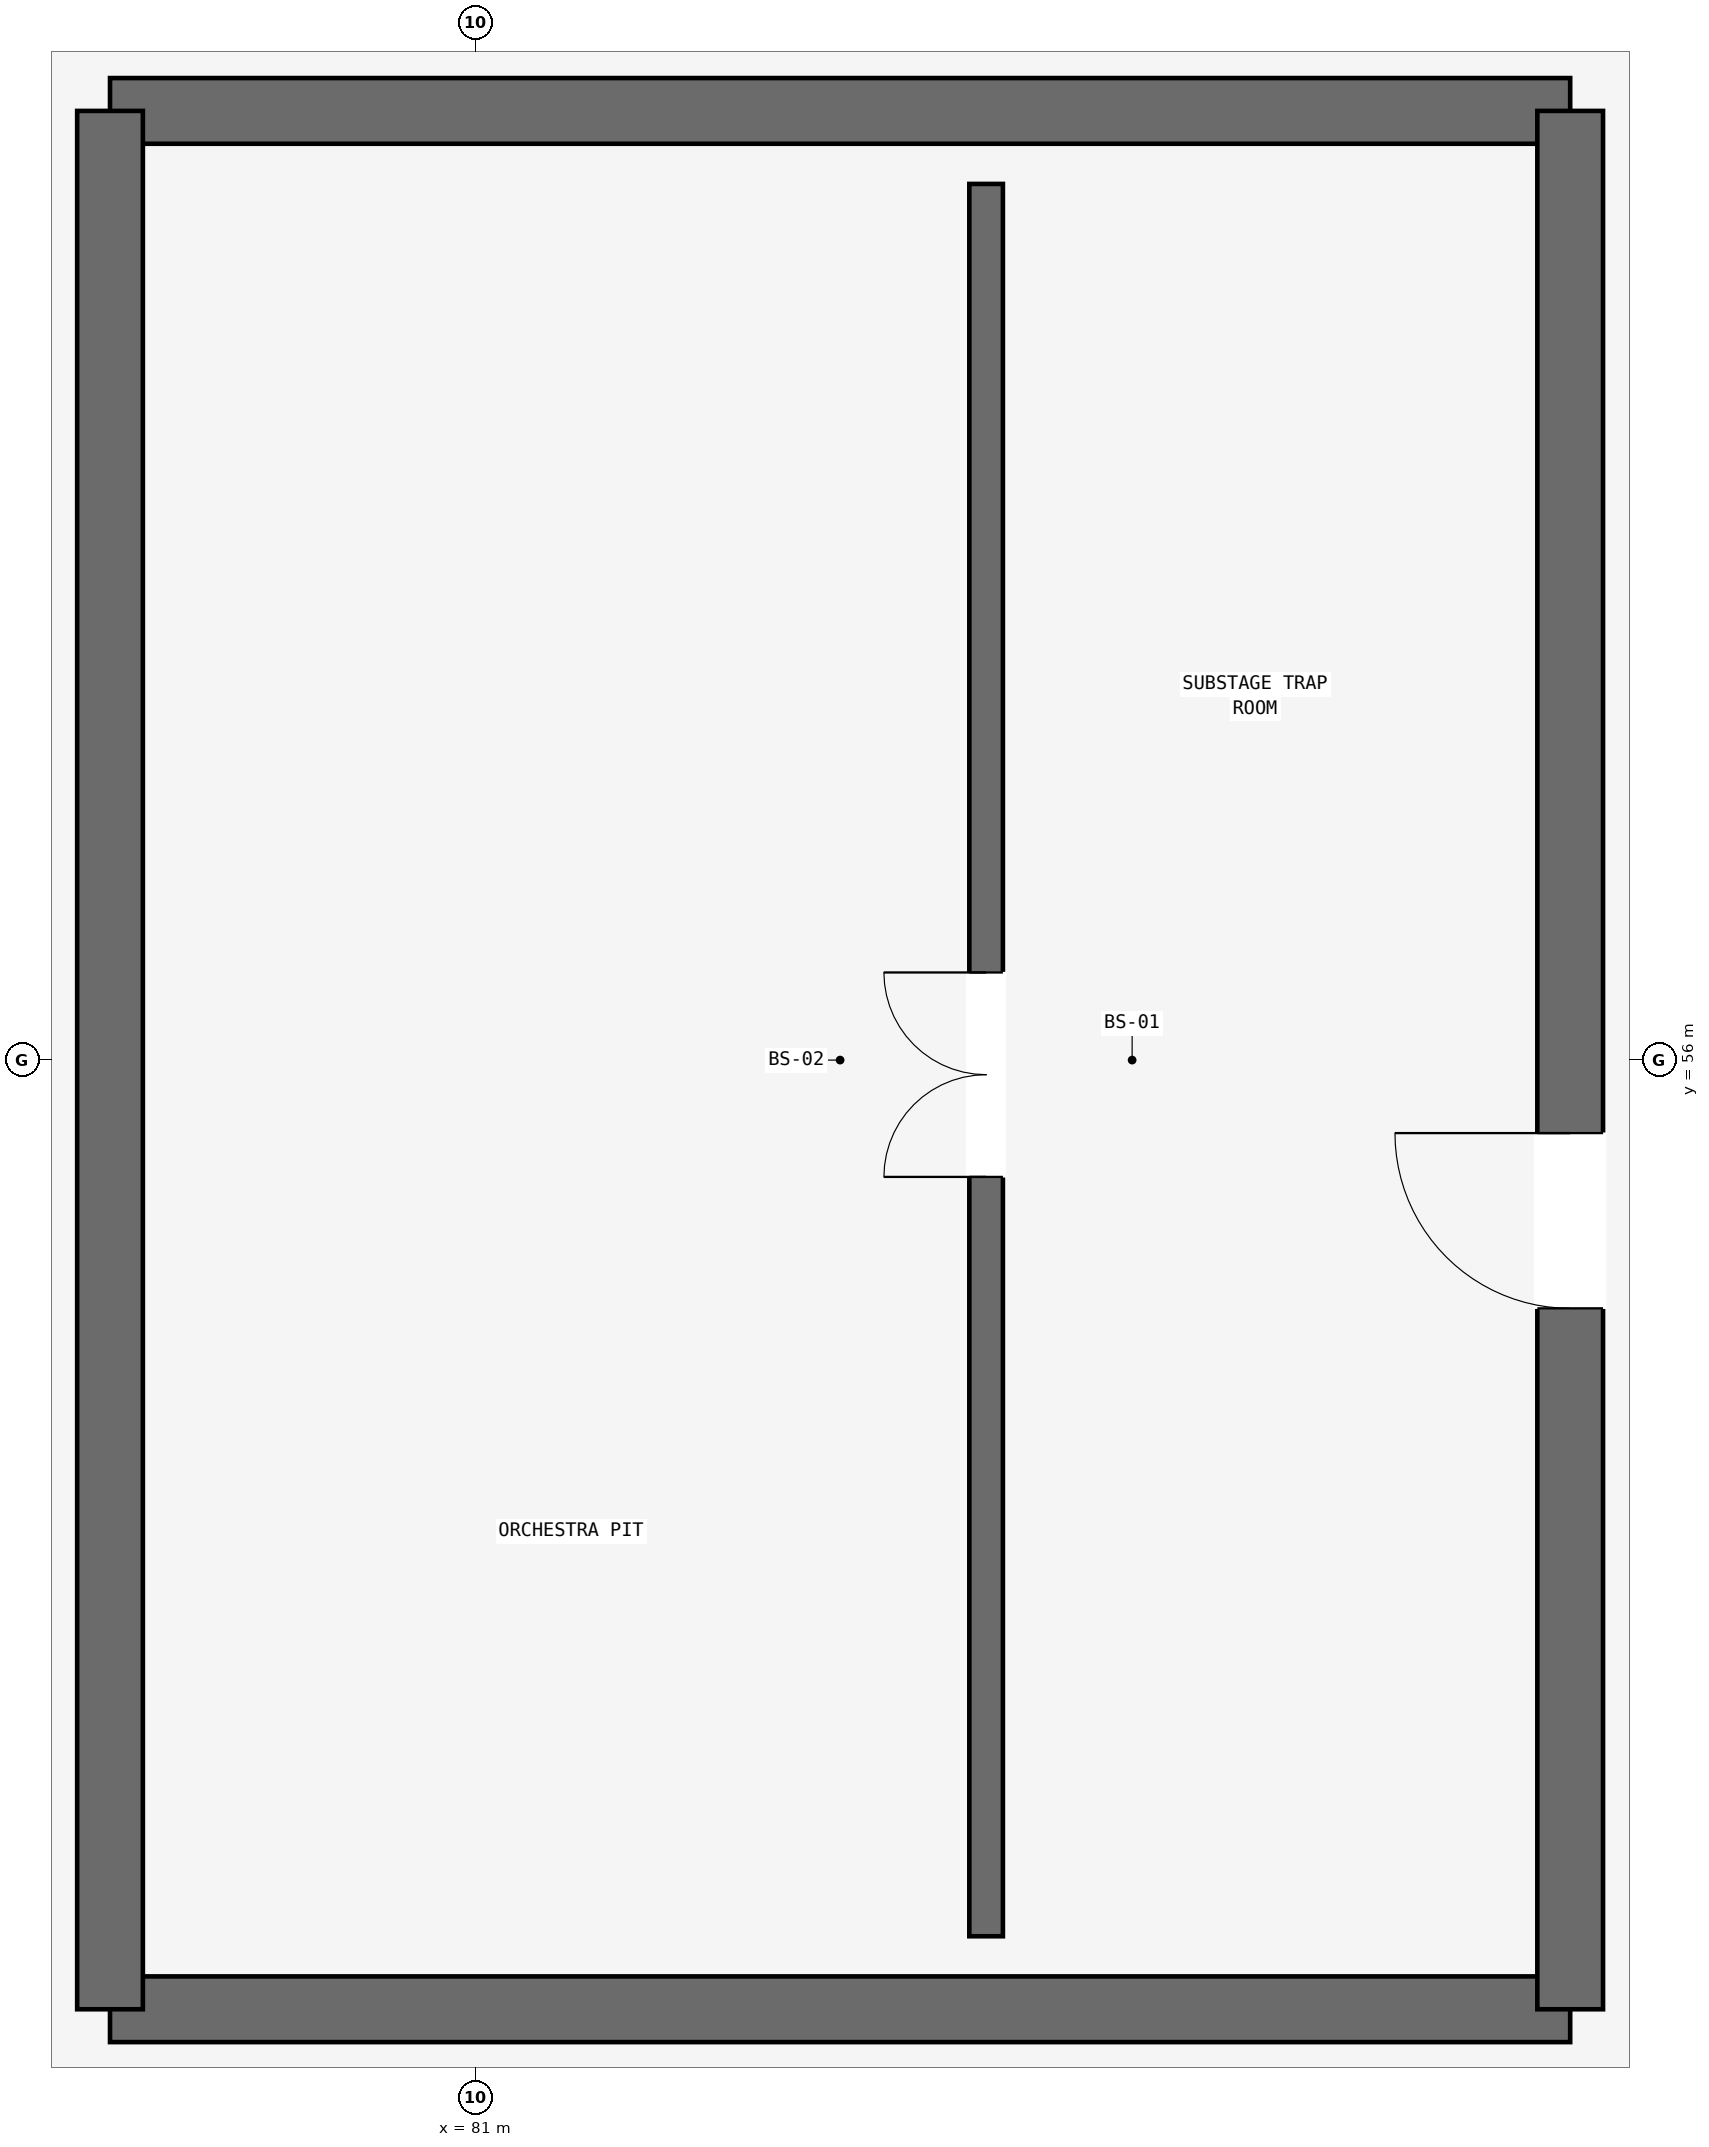
"""IFC4 building model, lengths in metres.
Left out: names, types, materials, properties, quantities, classifications, styles, units other than length and angle.
Written with IfcOpenShell. Run it as: python <this file> out.ifc"""

import sys

from ifc_helpers import new_model, si_unit, direction, frame, frame_2d, origin, place, context, subcontext, project, spatial, rectangle, extrude, element, fill, save


model = new_model("IFC4")
c1 = context("Model", 3, precision=1e-05, world=origin(), true_north=direction((0.0, 1.0)))
c2 = subcontext(c1, "Body", "Model", "MODEL_VIEW")
j1 = project(units=[si_unit("LENGTHUNIT", "METRE"), si_unit("PLANEANGLEUNIT", "RADIAN")], contexts=[c1])
p1 = place(None, origin())
s1 = spatial("IfcSite", under=j1, at=p1, CompositionType="ELEMENT")
p2 = place(p1, origin())
s2 = spatial("IfcBuilding", under=s1, at=p2, CompositionType="ELEMENT")
p3 = place(p2, frame((0.0, 0.0, -5.1)))
s3 = spatial("IfcBuildingStorey", under=s2, at=p3, CompositionType="ELEMENT", Elevation=-5.1)
for number, where, z_axis, x_axis in (
    (1, (78.5, 62.5, 0.0), (0.0, 0.0, 1.0), (1.0, 0.0, 0.0)),
    (2, (78.5, 49.5, 0.0), (0.0, 0.0, 1.0), (1.0, 0.0, 0.0)),
):
    element("IfcWall", number, at=place(p3, frame(where, z_axis=z_axis, x_axis=x_axis)), inside=s3, PredefinedType="SHEAR", context=c2, shape_type="SweptSolid", body=[
        extrude(rectangle(XDim=10.0, YDim=0.45, at=frame_2d((5.0, 0.0))), origin(), (0.0, 0.0, 1.0), 5.1),
    ])
p4 = place(p3, frame((78.5, 49.5, 0.0), z_axis=(0.0, 0.0, 1.0), x_axis=(0.0, 1.0, 0.0)))
e3 = element("IfcWall", 3, at=p4, inside=s3, PredefinedType="SHEAR", context=c2, shape_type="SweptSolid", body=[
    extrude(rectangle(XDim=13.0, YDim=0.45, at=frame_2d((6.5, 0.0))), origin(), (0.0, 0.0, 1.0), 5.1),
])
p5 = place(p3, frame((88.5, 49.5, 0.0), z_axis=(0.0, 0.0, 1.0), x_axis=(0.0, 1.0, 0.0)))
e4 = element("IfcWall", 4, at=p5, inside=s3, PredefinedType="SHEAR", context=c2, shape_type="SweptSolid", body=[
    extrude(rectangle(XDim=13.0, YDim=0.45, at=frame_2d((6.5, 0.0))), origin(), (0.0, 0.0, 1.0), 5.1),
])
p6 = place(p5, frame((4.8, 0.0, 0.0)))
e5 = element("IfcOpeningElement", 5, at=p6, cuts=e4, PredefinedType="OPENING", context=c2, shape_type="SweptSolid", body=[
    extrude(rectangle(XDim=1.2, YDim=2.2, at=frame_2d((0.6, 1.1))), frame((0.0, 0.235, 0.0), z_axis=(0.0, -1.0, 0.0), x_axis=(1.0, 0.0, 0.0)), (0.0, 0.0, 1.0), 0.47),
])
p7 = place(p3, frame((84.5, 50.0, 0.0), z_axis=(0.0, 0.0, 1.0), x_axis=(0.0, 1.0, 0.0)))
e6 = element("IfcWall", 6, at=p7, inside=s3, PredefinedType="PARTITIONING", context=c2, shape_type="SweptSolid", body=[
    extrude(rectangle(XDim=12.0, YDim=0.23, at=frame_2d((6.0, 0.0))), origin(), (0.0, 0.0, 1.0), 4.75),
])
p8 = place(p7, frame((5.2, 0.0, 0.0)))
e7 = element("IfcOpeningElement", 7, at=p8, cuts=e6, PredefinedType="OPENING", context=c2, shape_type="SweptSolid", body=[
    extrude(rectangle(XDim=1.4, YDim=2.2, at=frame_2d((0.7, 1.1))), frame((0.0, 0.125, 0.0), z_axis=(0.0, -1.0, 0.0), x_axis=(1.0, 0.0, 0.0)), (0.0, 0.0, 1.0), 0.25),
])
p9 = place(p8, origin())
e8 = element("IfcDoor", 8, at=p9, inside=s3, OperationType="DOUBLE_DOOR_SINGLE_SWING", PredefinedType="DOOR", context=c2, shape_type="SweptSolid", body=[
    extrude(rectangle(XDim=1.4, YDim=2.2, at=frame_2d((0.7, 1.1))), frame((0.0, 0.025, 0.0), z_axis=(0.0, -1.0, 0.0), x_axis=(1.0, 0.0, 0.0)), (0.0, 0.0, 1.0), 0.05),
])
fill(e7, e8)
p10 = place(p6, origin())
e9 = element("IfcDoor", 9, at=p10, inside=s3, OperationType="SINGLE_SWING_RIGHT", PredefinedType="DOOR", context=c2, shape_type="SweptSolid", body=[
    extrude(rectangle(XDim=1.2, YDim=2.2, at=frame_2d((0.6, 1.1))), frame((0.0, 0.025, 0.0), z_axis=(0.0, -1.0, 0.0), x_axis=(1.0, 0.0, 0.0)), (0.0, 0.0, 1.0), 0.05),
])
fill(e5, e9)
save(model, sys.argv[1])
